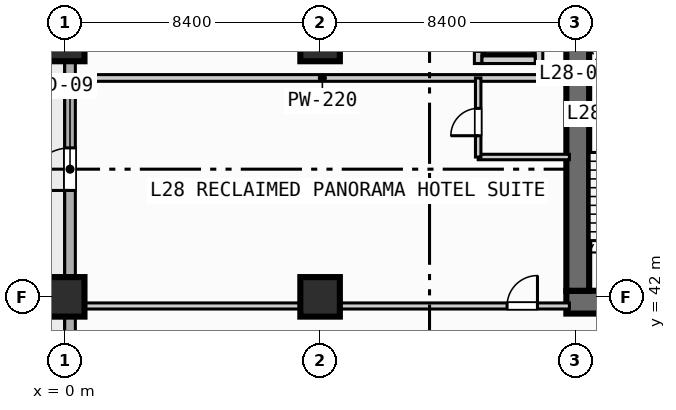
"""IFC4 building model, lengths in metres.
Left out: names, types, materials, properties, quantities, classifications, styles, units other than length and angle.
Written with IfcOpenShell. Run it as: python <this file> out.ifc"""

import sys

from ifc_helpers import new_model, si_unit, direction, frame, frame_2d, origin, origin_2d, place, context, subcontext, project, spatial, rectangle, extrude, element, fill, save


model = new_model("IFC4")
c1 = context("Model", 3, precision=1e-05, world=origin(), true_north=direction((0.0, 1.0)))
c2 = subcontext(c1, "Body", "Model", "MODEL_VIEW")
j1 = project(units=[si_unit("LENGTHUNIT", "METRE"), si_unit("PLANEANGLEUNIT", "RADIAN")], contexts=[c1])
p1 = place(None, origin())
s1 = spatial("IfcSite", under=j1, at=p1, CompositionType="ELEMENT")
p2 = place(p1, origin())
s2 = spatial("IfcBuilding", under=s1, at=p2, CompositionType="ELEMENT")
p3 = place(p2, frame((0.0, 0.0, 119.0)))
s3 = spatial("IfcBuildingStorey", under=s2, at=p3, CompositionType="ELEMENT", Elevation=119.0)
p4 = place(p3, frame((16.5, 41.825, 0.0), z_axis=(0.0, 0.0, 1.0), x_axis=(1.0, 0.0, 0.0)))
e1 = element("IfcWall", 1, at=p4, inside=s3, PredefinedType="SHEAR", context=c2, shape_type="SweptSolid", body=[
    extrude(rectangle(XDim=1.5, YDim=0.75, at=frame_2d((0.75, 0.0))), origin(), (0.0, 0.0, 1.0), 3.55),
])
p5 = place(p3, frame((16.875, 42.2, 0.0), z_axis=(0.0, 0.0, 1.0), x_axis=(0.0, 1.0, 0.0)))
e2 = element("IfcWall", 2, at=p5, inside=s3, PredefinedType="SHEAR", context=c2, shape_type="SweptSolid", body=[
    extrude(rectangle(XDim=16.35, YDim=0.75, at=frame_2d((8.175, 0.0))), origin(), (0.0, 0.0, 1.0), 3.55),
])
for number, where, z_axis, x_axis in (
    (3, (0.0, 42.0, 0.0), (0.0, 0.0, 1.0), (1.0, 0.0, 0.0)),
    (4, (0.0, 50.4, 0.0), (0.0, 0.0, 1.0), (1.0, 0.0, 0.0)),
    (5, (8.4, 42.0, 0.0), (0.0, 0.0, 1.0), (1.0, 0.0, 0.0)),
    (6, (8.4, 50.4, 0.0), (0.0, 0.0, 1.0), (1.0, 0.0, 0.0)),
):
    element("IfcColumn", number, at=place(p3, frame(where, z_axis=z_axis, x_axis=x_axis)), inside=s3, PredefinedType="COLUMN", context=c2, shape_type="SweptSolid", body=[
        extrude(rectangle(XDim=1.3, YDim=1.3, at=origin_2d()), origin(), (0.0, 0.0, 1.0), 3.8),
    ])
p6 = place(p3, frame((0.175, 3.175, 0.0), z_axis=(0.0, 0.0, 1.0), x_axis=(0.0, 1.0, 0.0)))
e7 = element("IfcWall", 7, at=p6, inside=s3, PredefinedType="STANDARD", context=c2, shape_type="SweptSolid", body=[
    extrude(rectangle(XDim=86.05, YDim=0.35, at=frame_2d((43.025, 0.0))), origin(), (0.0, 0.0, 1.0), 3.55),
])
p7 = place(p6, frame((42.325, 0.0, 0.0)))
e8 = element("IfcOpeningElement", 8, at=p7, cuts=e7, PredefinedType="OPENING", context=c2, shape_type="SweptSolid", body=[
    extrude(rectangle(XDim=1.4, YDim=2.2, at=frame_2d((0.7, 1.1))), frame((0.0, 0.185, 0.0), z_axis=(0.0, -1.0, 0.0), x_axis=(1.0, 0.0, 0.0)), (0.0, 0.0, 1.0), 0.37),
])
p8 = place(p6, frame((33.525, 0.0, 0.85)))
e9 = element("IfcOpeningElement", 9, at=p8, cuts=e7, PredefinedType="OPENING", context=c2, shape_type="SweptSolid", body=[
    extrude(rectangle(XDim=2.2, YDim=1.8, at=frame_2d((1.1, 0.9))), frame((0.0, 0.185, 0.0), z_axis=(0.0, -1.0, 0.0), x_axis=(1.0, 0.0, 0.0)), (0.0, 0.0, 1.0), 0.37),
])
p9 = place(p6, frame((22.775, 0.0, 0.85)))
e10 = element("IfcOpeningElement", 10, at=p9, cuts=e7, PredefinedType="OPENING", context=c2, shape_type="SweptSolid", body=[
    extrude(rectangle(XDim=1.8, YDim=1.8, at=frame_2d((0.9, 0.9))), frame((0.0, 0.185, 0.0), z_axis=(0.0, -1.0, 0.0), x_axis=(1.0, 0.0, 0.0)), (0.0, 0.0, 1.0), 0.37),
])
p10 = place(p6, frame((27.625, 0.0, 0.85)))
e11 = element("IfcOpeningElement", 11, at=p10, cuts=e7, PredefinedType="OPENING", context=c2, shape_type="SweptSolid", body=[
    extrude(rectangle(XDim=1.8, YDim=1.8, at=frame_2d((0.9, 0.9))), frame((0.0, 0.185, 0.0), z_axis=(0.0, -1.0, 0.0), x_axis=(1.0, 0.0, 0.0)), (0.0, 0.0, 1.0), 0.37),
])
p11 = place(p3, frame((13.6, 49.675, 0.0), z_axis=(0.0, 0.0, 1.0), x_axis=(0.0, 1.0, 0.0)))
e12 = element("IfcWall", 12, at=p11, inside=s3, PredefinedType="SOLIDWALL", context=c2, shape_type="SweptSolid", body=[
    extrude(rectangle(XDim=2.75, YDim=0.25, at=frame_2d((1.375, 0.0))), origin(), (0.0, 0.0, 1.0), 3.55),
])
p12 = place(p11, frame((0.4, 0.0, 0.0)))
e13 = element("IfcOpeningElement", 13, at=p12, cuts=e12, PredefinedType="OPENING", context=c2, shape_type="SweptSolid", body=[
    extrude(rectangle(XDim=1.1, YDim=2.15, at=frame_2d((0.55, 1.075))), frame((0.0, 0.135, 0.0), z_axis=(0.0, -1.0, 0.0), x_axis=(1.0, 0.0, 0.0)), (0.0, 0.0, 1.0), 0.27),
])
p13 = place(p3, frame((15.6, 49.675, 0.0), z_axis=(0.0, 0.0, 1.0), x_axis=(0.0, 1.0, 0.0)))
e14 = element("IfcWall", 14, at=p13, inside=s3, PredefinedType="SOLIDWALL", context=c2, shape_type="SweptSolid", body=[
    extrude(rectangle(XDim=2.75, YDim=0.25, at=frame_2d((1.375, 0.0))), origin(), (0.0, 0.0, 1.0), 3.55),
])
p14 = place(p3, frame((13.725, 49.8, 0.0), z_axis=(0.0, 0.0, 1.0), x_axis=(1.0, 0.0, 0.0)))
e15 = element("IfcWall", 15, at=p14, inside=s3, PredefinedType="SOLIDWALL", context=c2, shape_type="SweptSolid", body=[
    extrude(rectangle(XDim=1.75, YDim=0.25, at=frame_2d((0.875, 0.0))), origin(), (0.0, 0.0, 1.0), 3.55),
])
p15 = place(p3, frame((0.35, 41.7, 0.0), z_axis=(0.0, 0.0, 1.0), x_axis=(1.0, 0.0, 0.0)))
e16 = element("IfcWall", 16, at=p15, inside=s3, PredefinedType="PARTITIONING", context=c2, shape_type="SweptSolid", body=[
    extrude(rectangle(XDim=16.25, YDim=0.2, at=frame_2d((8.125, 0.0))), origin(), (0.0, 0.0, 1.0), 2.8),
])
p16 = place(p15, frame((14.2, 0.0, 0.0)))
e17 = element("IfcOpeningElement", 17, at=p16, cuts=e16, PredefinedType="OPENING", context=c2, shape_type="SweptSolid", body=[
    extrude(rectangle(XDim=1.0, YDim=2.15, at=frame_2d((0.5, 1.075))), frame((0.0, 0.11, 0.0), z_axis=(0.0, -1.0, 0.0), x_axis=(1.0, 0.0, 0.0)), (0.0, 0.0, 1.0), 0.22),
])
p17 = place(p3, frame((0.35, 49.2, 0.0), z_axis=(0.0, 0.0, 1.0), x_axis=(1.0, 0.0, 0.0)))
e18 = element("IfcWall", 18, at=p17, inside=s3, PredefinedType="PARTITIONING", context=c2, shape_type="SweptSolid", body=[
    extrude(rectangle(XDim=16.25, YDim=0.22, at=frame_2d((8.125, 0.0))), origin(), (0.0, 0.0, 1.0), 3.55),
])
p18 = place(p3, frame((13.6, 46.6, 0.0), z_axis=(0.0, 0.0, 1.0), x_axis=(1.0, 0.0, 0.0)))
e19 = element("IfcWall", 19, at=p18, inside=s3, PredefinedType="PLUMBINGWALL", context=c2, shape_type="SweptSolid", body=[
    extrude(rectangle(XDim=3.0, YDim=0.18, at=frame_2d((1.5, 0.0))), origin(), (0.0, 0.0, 1.0), 3.55),
])
p19 = place(p3, frame((13.6, 46.6, 0.0), z_axis=(0.0, 0.0, 1.0), x_axis=(0.0, 1.0, 0.0)))
e20 = element("IfcWall", 20, at=p19, inside=s3, PredefinedType="PLUMBINGWALL", context=c2, shape_type="SweptSolid", body=[
    extrude(rectangle(XDim=2.6, YDim=0.18, at=frame_2d((1.3, 0.0))), origin(), (0.0, 0.0, 1.0), 3.55),
])
p20 = place(p19, frame((0.7, 0.0, 0.0)))
e21 = element("IfcOpeningElement", 21, at=p20, cuts=e20, PredefinedType="OPENING", context=c2, shape_type="SweptSolid", body=[
    extrude(rectangle(XDim=0.9, YDim=2.1, at=frame_2d((0.45, 1.05))), frame((0.0, 0.1, 0.0), z_axis=(0.0, -1.0, 0.0), x_axis=(1.0, 0.0, 0.0)), (0.0, 0.0, 1.0), 0.2),
])
p21 = place(p7, origin())
e22 = element("IfcDoor", 22, at=p21, inside=s3, OperationType="SINGLE_SWING_LEFT", PredefinedType="DOOR", context=c2, shape_type="SweptSolid", body=[
    extrude(rectangle(XDim=1.4, YDim=2.2, at=frame_2d((0.7, 1.1))), frame((0.0, 0.025, 0.0), z_axis=(0.0, -1.0, 0.0), x_axis=(1.0, 0.0, 0.0)), (0.0, 0.0, 1.0), 0.05),
])
fill(e8, e22)
p22 = place(p16, origin())
e23 = element("IfcDoor", 23, at=p22, inside=s3, OperationType="SINGLE_SWING_RIGHT", PredefinedType="DOOR", context=c2, shape_type="SweptSolid", body=[
    extrude(rectangle(XDim=1.0, YDim=2.15, at=frame_2d((0.5, 1.075))), frame((0.0, 0.025, 0.0), z_axis=(0.0, -1.0, 0.0), x_axis=(1.0, 0.0, 0.0)), (0.0, 0.0, 1.0), 0.05),
])
fill(e17, e23)
p23 = place(p20, origin())
e24 = element("IfcDoor", 24, at=p23, inside=s3, OperationType="SINGLE_SWING_LEFT", PredefinedType="DOOR", context=c2, shape_type="SweptSolid", body=[
    extrude(rectangle(XDim=0.9, YDim=2.1, at=frame_2d((0.45, 1.05))), frame((0.0, 0.025, 0.0), z_axis=(0.0, -1.0, 0.0), x_axis=(1.0, 0.0, 0.0)), (0.0, 0.0, 1.0), 0.05),
])
fill(e21, e24)
save(model, sys.argv[1])
